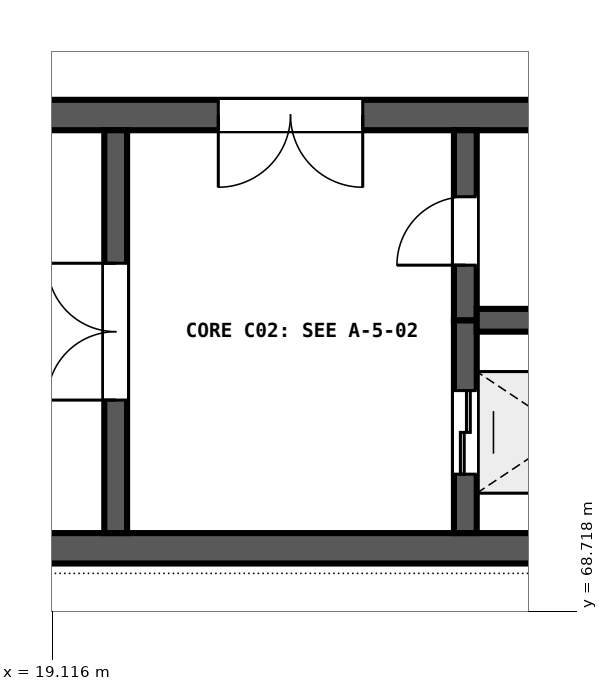
"""IFC4 building model, lengths in metres.
Left out: names, types, materials, properties, quantities, classifications, styles, units other than length and angle.
Written with IfcOpenShell. Run it as: python <this file> out.ifc"""

import sys

from ifc_helpers import new_model, si_unit, direction, frame, frame_2d, origin, place, context, subcontext, project, spatial, rectangle, extrude, element, fill, save


model = new_model("IFC4")
c1 = context("Model", 3, precision=1e-05, world=origin(), true_north=direction((0.0, 1.0)))
c2 = subcontext(c1, "Body", "Model", "MODEL_VIEW")
j1 = project(units=[si_unit("LENGTHUNIT", "METRE"), si_unit("PLANEANGLEUNIT", "RADIAN")], contexts=[c1])
p1 = place(None, origin())
s1 = spatial("IfcSite", under=j1, at=p1, CompositionType="ELEMENT")
p2 = place(p1, origin())
s2 = spatial("IfcBuilding", under=s1, at=p2, CompositionType="ELEMENT")
p3 = place(p2, origin())
s3 = spatial("IfcBuildingStorey", under=s2, at=p3, CompositionType="ELEMENT", Elevation=0.0)
p4 = place(p3, frame((9.9, 69.55, 0.0), z_axis=(0.0, 0.0, 1.0), x_axis=(1.0, 0.0, 0.0)))
e1 = element("IfcWall", 1, at=p4, inside=s3, PredefinedType="SHEAR", context=c2, shape_type="SweptSolid", body=[
    extrude(rectangle(XDim=18.0, YDim=0.4, at=frame_2d((9.0, 0.0))), origin(), (0.0, 0.0, 1.0), 4.5),
])
p5 = place(p3, frame((27.9, 75.25, 0.0), z_axis=(0.0, 0.0, 1.0), x_axis=(-1.0, 0.0, 0.0)))
e2 = element("IfcWall", 2, at=p5, inside=s3, PredefinedType="SHEAR", context=c2, shape_type="SweptSolid", body=[
    extrude(rectangle(XDim=18.0, YDim=0.4, at=frame_2d((9.0, 0.0))), origin(), (0.0, 0.0, 1.0), 4.5),
])
p6 = place(p5, frame((4.7, 0.0, 0.0)))
e3 = element("IfcOpeningElement", 3, at=p6, cuts=e2, PredefinedType="OPENING", context=c2, shape_type="SweptSolid", body=[
    extrude(rectangle(XDim=1.9, YDim=2.25, at=frame_2d((0.95, 1.125))), frame((0.0, 0.21, 0.0), z_axis=(0.0, -1.0, 0.0), x_axis=(1.0, 0.0, 0.0)), (0.0, 0.0, 1.0), 0.42),
])
p7 = place(p3, frame((19.95, 69.75, 0.0), z_axis=(0.0, 0.0, 1.0), x_axis=(0.0, 1.0, 0.0)))
e4 = element("IfcWall", 4, at=p7, inside=s3, PredefinedType="SHEAR", context=c2, shape_type="SweptSolid", body=[
    extrude(rectangle(XDim=5.3, YDim=0.3, at=frame_2d((2.65, 0.0))), origin(), (0.0, 0.0, 1.0), 4.5),
])
p8 = place(p7, frame((1.75, 0.0, 0.0)))
e5 = element("IfcOpeningElement", 5, at=p8, cuts=e4, PredefinedType="OPENING", context=c2, shape_type="SweptSolid", body=[
    extrude(rectangle(XDim=1.8, YDim=2.25, at=frame_2d((0.9, 1.125))), frame((0.0, 0.16, 0.0), z_axis=(0.0, -1.0, 0.0), x_axis=(1.0, 0.0, 0.0)), (0.0, 0.0, 1.0), 0.32),
])
p9 = place(p3, frame((24.55, 69.75, 0.0), z_axis=(0.0, 0.0, 1.0), x_axis=(0.0, 1.0, 0.0)))
e6 = element("IfcWall", 6, at=p9, inside=s3, PredefinedType="SHEAR", context=c2, shape_type="SweptSolid", body=[
    extrude(rectangle(XDim=2.8, YDim=0.3, at=frame_2d((1.4, 0.0))), origin(), (0.0, 0.0, 1.0), 4.5),
])
p10 = place(p9, frame((0.775, 0.0, 0.0)))
e7 = element("IfcOpeningElement", 7, at=p10, cuts=e6, PredefinedType="OPENING", context=c2, shape_type="SweptSolid", body=[
    extrude(rectangle(XDim=1.1, YDim=2.1, at=frame_2d((0.55, 1.05))), frame((0.0, 0.16, 0.0), z_axis=(0.0, -1.0, 0.0), x_axis=(1.0, 0.0, 0.0)), (0.0, 0.0, 1.0), 0.32),
])
p11 = place(p3, frame((24.55, 72.55, 0.0), z_axis=(0.0, 0.0, 1.0), x_axis=(0.0, 1.0, 0.0)))
e8 = element("IfcWall", 8, at=p11, inside=s3, PredefinedType="SHEAR", context=c2, shape_type="SweptSolid", body=[
    extrude(rectangle(XDim=2.5, YDim=0.3, at=frame_2d((1.25, 0.0))), origin(), (0.0, 0.0, 1.0), 4.5),
])
p12 = place(p11, frame((0.725, 0.0, 0.0)))
e9 = element("IfcOpeningElement", 9, at=p12, cuts=e8, PredefinedType="OPENING", context=c2, shape_type="SweptSolid", body=[
    extrude(rectangle(XDim=0.9, YDim=2.1, at=frame_2d((0.45, 1.05))), frame((0.0, 0.16, 0.0), z_axis=(0.0, -1.0, 0.0), x_axis=(1.0, 0.0, 0.0)), (0.0, 0.0, 1.0), 0.32),
])
p13 = place(p3, frame((24.7, 72.55, 0.0), z_axis=(0.0, 0.0, 1.0), x_axis=(1.0, 0.0, 0.0)))
e10 = element("IfcWall", 10, at=p13, inside=s3, PredefinedType="SHEAR", context=c2, shape_type="SweptSolid", body=[
    extrude(rectangle(XDim=2.85, YDim=0.3, at=frame_2d((1.425, 0.0))), origin(), (0.0, 0.0, 1.0), 4.5),
])
p14 = place(p8, origin())
e11 = element("IfcDoor", 11, at=p14, inside=s3, OperationType="DOUBLE_DOOR_SINGLE_SWING", PredefinedType="DOOR", context=c2, shape_type="SweptSolid", body=[
    extrude(rectangle(XDim=1.8, YDim=2.25, at=frame_2d((0.9, 1.125))), frame((0.0, 0.025, 0.0), z_axis=(0.0, -1.0, 0.0), x_axis=(1.0, 0.0, 0.0)), (0.0, 0.0, 1.0), 0.05),
])
fill(e5, e11)
p15 = place(p12, origin())
e12 = element("IfcDoor", 12, at=p15, inside=s3, OperationType="SINGLE_SWING_LEFT", PredefinedType="DOOR", context=c2, shape_type="SweptSolid", body=[
    extrude(rectangle(XDim=0.9, YDim=2.1, at=frame_2d((0.45, 1.05))), frame((0.0, 0.025, 0.0), z_axis=(0.0, -1.0, 0.0), x_axis=(1.0, 0.0, 0.0)), (0.0, 0.0, 1.0), 0.05),
])
fill(e9, e12)
p16 = place(p10, origin())
e13 = element("IfcDoor", 13, at=p16, inside=s3, OperationType="DOUBLE_DOOR_SLIDING", PredefinedType="DOOR", context=c2, shape_type="SweptSolid", body=[
    extrude(rectangle(XDim=1.1, YDim=2.1, at=frame_2d((0.55, 1.05))), frame((0.0, 0.025, 0.0), z_axis=(0.0, -1.0, 0.0), x_axis=(1.0, 0.0, 0.0)), (0.0, 0.0, 1.0), 0.05),
])
fill(e7, e13)
p17 = place(p6, origin())
e14 = element("IfcDoor", 14, at=p17, inside=s3, OperationType="DOUBLE_DOOR_SINGLE_SWING", PredefinedType="DOOR", context=c2, shape_type="SweptSolid", body=[
    extrude(rectangle(XDim=1.9, YDim=2.25, at=frame_2d((0.95, 1.125))), frame((0.0, 0.025, 0.0), z_axis=(0.0, -1.0, 0.0), x_axis=(1.0, 0.0, 0.0)), (0.0, 0.0, 1.0), 0.05),
])
fill(e3, e14)
save(model, sys.argv[1])
